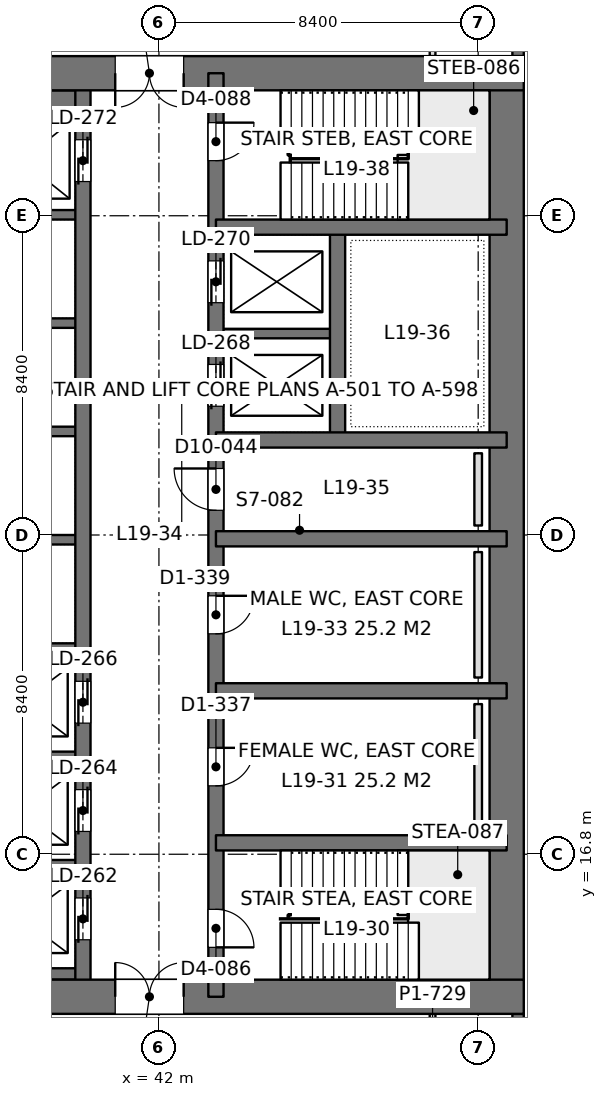
"""IFC4 building model, lengths in metres.
Left out: names, types, materials, properties, quantities, classifications, styles, units other than length and angle.
Written with IfcOpenShell. Run it as: python <this file> out.ifc"""

import sys

from ifc_helpers import new_model, si_unit, direction, frame, frame_2d, origin, place, context, subcontext, project, spatial, rectangle, extrude, element, fill, save


model = new_model("IFC4")
c1 = context("Model", 3, precision=1e-05, world=origin(), true_north=direction((0.0, 1.0)))
c2 = subcontext(c1, "Body", "Model", "MODEL_VIEW")
j1 = project(units=[si_unit("LENGTHUNIT", "METRE"), si_unit("PLANEANGLEUNIT", "RADIAN")], contexts=[c1])
p1 = place(None, origin())
s1 = spatial("IfcSite", under=j1, at=p1, CompositionType="ELEMENT")
p2 = place(p1, origin())
s2 = spatial("IfcBuilding", under=s1, at=p2, CompositionType="ELEMENT")
p3 = place(p2, frame((0.0, 0.0, 86.4)))
s3 = spatial("IfcBuildingStorey", under=s2, at=p3, CompositionType="ELEMENT", Elevation=86.4)
p4 = place(p3, frame((33.6, 13.05, 0.0), z_axis=(0.0, 0.0, 1.0), x_axis=(1.0, 0.0, 0.0)))
e1 = element("IfcWall", 1, at=p4, inside=s3, PredefinedType="SHEAR", context=c2, shape_type="SweptSolid", body=[
    extrude(rectangle(XDim=18.0, YDim=0.9, at=frame_2d((9.0, 0.0))), origin(), (0.0, 0.0, 1.0), 4.5),
])
p5 = place(p4, frame((7.25, 0.0, 0.0)))
e2 = element("IfcOpeningElement", 2, at=p5, cuts=e1, PredefinedType="OPENING", context=c2, shape_type="SweptSolid", body=[
    extrude(rectangle(XDim=1.8, YDim=2.4, at=frame_2d((0.9, 1.2))), frame((0.0, 0.46, 0.0), z_axis=(0.0, -1.0, 0.0), x_axis=(1.0, 0.0, 0.0)), (0.0, 0.0, 1.0), 0.92),
])
p6 = place(p3, frame((33.6, 37.35, 0.0), z_axis=(0.0, 0.0, 1.0), x_axis=(1.0, 0.0, 0.0)))
e3 = element("IfcWall", 3, at=p6, inside=s3, PredefinedType="SHEAR", context=c2, shape_type="SweptSolid", body=[
    extrude(rectangle(XDim=18.0, YDim=0.9, at=frame_2d((9.0, 0.0))), origin(), (0.0, 0.0, 1.0), 4.5),
])
p7 = place(p6, frame((7.25, 0.0, 0.0)))
e4 = element("IfcOpeningElement", 4, at=p7, cuts=e3, PredefinedType="OPENING", context=c2, shape_type="SweptSolid", body=[
    extrude(rectangle(XDim=1.8, YDim=2.4, at=frame_2d((0.9, 1.2))), frame((0.0, 0.46, 0.0), z_axis=(0.0, -1.0, 0.0), x_axis=(1.0, 0.0, 0.0)), (0.0, 0.0, 1.0), 0.92),
])
p8 = place(p3, frame((51.15, 13.05, 0.0), z_axis=(0.0, 0.0, 1.0), x_axis=(0.0, 1.0, 0.0)))
e5 = element("IfcWall", 5, at=p8, inside=s3, PredefinedType="SHEAR", context=c2, shape_type="SweptSolid", body=[
    extrude(rectangle(XDim=24.3, YDim=0.9, at=frame_2d((12.15, 0.0))), origin(), (0.0, 0.0, 1.0), 4.5),
])
p9 = place(p3, frame((43.5, 13.05, 0.0), z_axis=(0.0, 0.0, 1.0), x_axis=(0.0, 1.0, 0.0)))
e6 = element("IfcWall", 6, at=p9, inside=s3, PredefinedType="SHEAR", context=c2, shape_type="SweptSolid", body=[
    extrude(rectangle(XDim=24.3, YDim=0.4, at=frame_2d((12.15, 0.0))), origin(), (0.0, 0.0, 1.0), 4.5),
])
p10 = place(p9, frame((1.3, 0.0, 0.0)))
e7 = element("IfcOpeningElement", 7, at=p10, cuts=e6, PredefinedType="OPENING", context=c2, shape_type="SweptSolid", body=[
    extrude(rectangle(XDim=1.0, YDim=2.2, at=frame_2d((0.5, 1.1))), frame((0.0, 0.21, 0.0), z_axis=(0.0, -1.0, 0.0), x_axis=(1.0, 0.0, 0.0)), (0.0, 0.0, 1.0), 0.42),
])
p11 = place(p9, frame((22.0, 0.0, 0.0)))
e8 = element("IfcOpeningElement", 8, at=p11, cuts=e6, PredefinedType="OPENING", context=c2, shape_type="SweptSolid", body=[
    extrude(rectangle(XDim=1.0, YDim=2.2, at=frame_2d((0.5, 1.1))), frame((0.0, 0.21, 0.0), z_axis=(0.0, -1.0, 0.0), x_axis=(1.0, 0.0, 0.0)), (0.0, 0.0, 1.0), 0.42),
])
p12 = place(p9, frame((5.55, 0.0, 0.0)))
e9 = element("IfcOpeningElement", 9, at=p12, cuts=e6, PredefinedType="OPENING", context=c2, shape_type="SweptSolid", body=[
    extrude(rectangle(XDim=1.0, YDim=2.2, at=frame_2d((0.5, 1.1))), frame((0.0, 0.21, 0.0), z_axis=(0.0, -1.0, 0.0), x_axis=(1.0, 0.0, 0.0)), (0.0, 0.0, 1.0), 0.42),
])
p13 = place(p9, frame((9.55, 0.0, 0.0)))
e10 = element("IfcOpeningElement", 10, at=p13, cuts=e6, PredefinedType="OPENING", context=c2, shape_type="SweptSolid", body=[
    extrude(rectangle(XDim=1.0, YDim=2.2, at=frame_2d((0.5, 1.1))), frame((0.0, 0.21, 0.0), z_axis=(0.0, -1.0, 0.0), x_axis=(1.0, 0.0, 0.0)), (0.0, 0.0, 1.0), 0.42),
])
p14 = place(p9, frame((12.8, 0.0, 0.0)))
e11 = element("IfcOpeningElement", 11, at=p14, cuts=e6, PredefinedType="OPENING", context=c2, shape_type="SweptSolid", body=[
    extrude(rectangle(XDim=1.1, YDim=2.2, at=frame_2d((0.55, 1.1))), frame((0.0, 0.21, 0.0), z_axis=(0.0, -1.0, 0.0), x_axis=(1.0, 0.0, 0.0)), (0.0, 0.0, 1.0), 0.42),
])
p15 = place(p9, frame((15.538, 0.0, 0.0)))
e12 = element("IfcOpeningElement", 12, at=p15, cuts=e6, PredefinedType="OPENING", context=c2, shape_type="SweptSolid", body=[
    extrude(rectangle(XDim=1.1, YDim=2.2, at=frame_2d((0.55, 1.1))), frame((0.0, 0.21, 0.0), z_axis=(0.0, -1.0, 0.0), x_axis=(1.0, 0.0, 0.0)), (0.0, 0.0, 1.0), 0.42),
])
p16 = place(p9, frame((18.262, 0.0, 0.0)))
e13 = element("IfcOpeningElement", 13, at=p16, cuts=e6, PredefinedType="OPENING", context=c2, shape_type="SweptSolid", body=[
    extrude(rectangle(XDim=1.1, YDim=2.2, at=frame_2d((0.55, 1.1))), frame((0.0, 0.21, 0.0), z_axis=(0.0, -1.0, 0.0), x_axis=(1.0, 0.0, 0.0)), (0.0, 0.0, 1.0), 0.42),
])
p17 = place(p3, frame((40.0, 13.05, 0.0), z_axis=(0.0, 0.0, 1.0), x_axis=(0.0, 1.0, 0.0)))
e14 = element("IfcWall", 14, at=p17, inside=s3, PredefinedType="SHEAR", context=c2, shape_type="SweptSolid", body=[
    extrude(rectangle(XDim=24.3, YDim=0.4, at=frame_2d((12.15, 0.0))), origin(), (0.0, 0.0, 1.0), 4.5),
])
p18 = place(p17, frame((1.5, 0.0, 0.0)))
e15 = element("IfcOpeningElement", 15, at=p18, cuts=e14, PredefinedType="OPENING", context=c2, shape_type="SweptSolid", body=[
    extrude(rectangle(XDim=1.1, YDim=2.2, at=frame_2d((0.55, 1.1))), frame((0.0, 0.21, 0.0), z_axis=(0.0, -1.0, 0.0), x_axis=(1.0, 0.0, 0.0)), (0.0, 0.0, 1.0), 0.42),
])
p19 = place(p17, frame((4.35, 0.0, 0.0)))
e16 = element("IfcOpeningElement", 16, at=p19, cuts=e14, PredefinedType="OPENING", context=c2, shape_type="SweptSolid", body=[
    extrude(rectangle(XDim=1.1, YDim=2.2, at=frame_2d((0.55, 1.1))), frame((0.0, 0.21, 0.0), z_axis=(0.0, -1.0, 0.0), x_axis=(1.0, 0.0, 0.0)), (0.0, 0.0, 1.0), 0.42),
])
p20 = place(p17, frame((7.2, 0.0, 0.0)))
e17 = element("IfcOpeningElement", 17, at=p20, cuts=e14, PredefinedType="OPENING", context=c2, shape_type="SweptSolid", body=[
    extrude(rectangle(XDim=1.1, YDim=2.2, at=frame_2d((0.55, 1.1))), frame((0.0, 0.21, 0.0), z_axis=(0.0, -1.0, 0.0), x_axis=(1.0, 0.0, 0.0)), (0.0, 0.0, 1.0), 0.42),
])
p21 = place(p17, frame((21.45, 0.0, 0.0)))
e18 = element("IfcOpeningElement", 18, at=p21, cuts=e14, PredefinedType="OPENING", context=c2, shape_type="SweptSolid", body=[
    extrude(rectangle(XDim=1.1, YDim=2.2, at=frame_2d((0.55, 1.1))), frame((0.0, 0.21, 0.0), z_axis=(0.0, -1.0, 0.0), x_axis=(1.0, 0.0, 0.0)), (0.0, 0.0, 1.0), 0.42),
])
for number, where, z_axis, x_axis in (
    (19, (51.15, 17.1, 0.0), (0.0, 0.0, 1.0), (-1.0, 0.0, 0.0)),
    (20, (51.15, 21.1, 0.0), (0.0, 0.0, 1.0), (-1.0, 0.0, 0.0)),
    (21, (51.15, 25.1, 0.0), (0.0, 0.0, 1.0), (-1.0, 0.0, 0.0)),
    (22, (51.15, 27.7, 0.0), (0.0, 0.0, 1.0), (-1.0, 0.0, 0.0)),
    (23, (51.15, 33.3, 0.0), (0.0, 0.0, 1.0), (-1.0, 0.0, 0.0)),
):
    element("IfcWall", number, at=place(p3, frame(where, z_axis=z_axis, x_axis=x_axis)), inside=s3, PredefinedType="SHEAR", context=c2, shape_type="SweptSolid", body=[
        extrude(rectangle(XDim=7.65, YDim=0.4, at=frame_2d((3.825, 0.0))), origin(), (0.0, 0.0, 1.0), 4.5),
    ])
p22 = place(p3, frame((46.7, 27.7, 0.0), z_axis=(0.0, 0.0, 1.0), x_axis=(0.0, 1.0, 0.0)))
e24 = element("IfcWall", 24, at=p22, inside=s3, PredefinedType="SHEAR", context=c2, shape_type="SweptSolid", body=[
    extrude(rectangle(XDim=5.6, YDim=0.4, at=frame_2d((2.8, 0.0))), origin(), (0.0, 0.0, 1.0), 4.5),
])
p23 = place(p3, frame((46.7, 30.5, 0.0), z_axis=(0.0, 0.0, 1.0), x_axis=(-1.0, 0.0, 0.0)))
e25 = element("IfcWall", 25, at=p23, inside=s3, PredefinedType="SHEAR", context=c2, shape_type="SweptSolid", body=[
    extrude(rectangle(XDim=3.2, YDim=0.25, at=frame_2d((1.6, 0.0))), origin(), (0.0, 0.0, 1.0), 4.5),
])
p24 = place(p3, frame((40.0, 13.65, 0.0), z_axis=(0.0, 0.0, 1.0), x_axis=(-1.0, 0.0, 0.0)))
e26 = element("IfcWall", 26, at=p24, inside=s3, PredefinedType="SHEAR", context=c2, shape_type="SweptSolid", body=[
    extrude(rectangle(XDim=3.2, YDim=0.3, at=frame_2d((1.6, 0.0))), origin(), (0.0, 0.0, 1.0), 4.5),
])
for number, where, z_axis, x_axis in (
    (27, (40.0, 16.525, 0.0), (0.0, 0.0, 1.0), (-1.0, 0.0, 0.0)),
    (28, (40.0, 19.375, 0.0), (0.0, 0.0, 1.0), (-1.0, 0.0, 0.0)),
    (29, (40.0, 22.225, 0.0), (0.0, 0.0, 1.0), (-1.0, 0.0, 0.0)),
    (30, (40.0, 25.075, 0.0), (0.0, 0.0, 1.0), (-1.0, 0.0, 0.0)),
    (31, (40.0, 27.925, 0.0), (0.0, 0.0, 1.0), (-1.0, 0.0, 0.0)),
    (32, (40.0, 30.775, 0.0), (0.0, 0.0, 1.0), (-1.0, 0.0, 0.0)),
    (33, (40.0, 33.625, 0.0), (0.0, 0.0, 1.0), (-1.0, 0.0, 0.0)),
):
    element("IfcWall", number, at=place(p3, frame(where, z_axis=z_axis, x_axis=x_axis)), inside=s3, PredefinedType="SHEAR", context=c2, shape_type="SweptSolid", body=[
        extrude(rectangle(XDim=3.2, YDim=0.25, at=frame_2d((1.6, 0.0))), origin(), (0.0, 0.0, 1.0), 4.5),
    ])
p25 = place(p3, frame((40.0, 36.625, 0.0), z_axis=(0.0, 0.0, 1.0), x_axis=(-1.0, 0.0, 0.0)))
e34 = element("IfcWall", 34, at=p25, inside=s3, PredefinedType="SHEAR", context=c2, shape_type="SweptSolid", body=[
    extrude(rectangle(XDim=3.2, YDim=0.55, at=frame_2d((1.6, 0.0))), origin(), (0.0, 0.0, 1.0), 4.5),
])
p26 = place(p3, frame((51.45, 42.0, 0.0), z_axis=(0.0, 0.0, 1.0), x_axis=(0.0, -1.0, 0.0)))
e35 = element("IfcWall", 35, at=p26, inside=s3, PredefinedType="SOLIDWALL", context=c2, shape_type="SweptSolid", body=[
    extrude(rectangle(XDim=4.2, YDim=0.3, at=frame_2d((2.1, 0.0))), origin(), (0.0, 0.0, 1.0), 4.3),
])
p27 = place(p26, frame((0.9, 0.0, 0.9)))
e36 = element("IfcOpeningElement", 36, at=p27, cuts=e35, PredefinedType="OPENING", context=c2, shape_type="SweptSolid", body=[
    extrude(rectangle(XDim=2.4, YDim=1.9, at=frame_2d((1.2, 0.95))), frame((0.0, 0.16, 0.0), z_axis=(0.0, -1.0, 0.0), x_axis=(1.0, 0.0, 0.0)), (0.0, 0.0, 1.0), 0.32),
])
p28 = place(p3, frame((51.45, 12.6, 0.0), z_axis=(0.0, 0.0, 1.0), x_axis=(0.0, -1.0, 0.0)))
e37 = element("IfcWall", 37, at=p28, inside=s3, PredefinedType="SOLIDWALL", context=c2, shape_type="SweptSolid", body=[
    extrude(rectangle(XDim=4.2, YDim=0.3, at=frame_2d((2.1, 0.0))), origin(), (0.0, 0.0, 1.0), 4.3),
])
p29 = place(p28, frame((0.9, 0.0, 0.9)))
e38 = element("IfcOpeningElement", 38, at=p29, cuts=e37, PredefinedType="OPENING", context=c2, shape_type="SweptSolid", body=[
    extrude(rectangle(XDim=2.4, YDim=1.9, at=frame_2d((1.2, 0.95))), frame((0.0, 0.16, 0.0), z_axis=(0.0, -1.0, 0.0), x_axis=(1.0, 0.0, 0.0)), (0.0, 0.0, 1.0), 0.32),
])
p30 = place(p3, frame((49.2, 10.4, 0.0), z_axis=(0.0, 0.0, 1.0), x_axis=(0.0, 1.0, 0.0)))
e39 = element("IfcWall", 39, at=p30, inside=s3, PredefinedType="PARTITIONING", context=c2, shape_type="SweptSolid", body=[
    extrude(rectangle(XDim=2.202, YDim=0.15, at=frame_2d((1.101, 0.0))), origin(), (0.0, 0.0, 1.0), 4.3),
])
p31 = place(p3, frame((49.2, 37.8, 0.0), z_axis=(0.0, 0.0, 1.0), x_axis=(0.0, 1.0, 0.0)))
e40 = element("IfcWall", 40, at=p31, inside=s3, PredefinedType="PARTITIONING", context=c2, shape_type="SweptSolid", body=[
    extrude(rectangle(XDim=2.2, YDim=0.15, at=frame_2d((1.1, 0.0))), origin(), (0.0, 0.0, 1.0), 4.3),
])
for number, where, z_axis, x_axis in (
    (41, (50.4, 17.45, 0.0), (0.0, 0.0, 1.0), (0.0, 1.0, 0.0)),
    (42, (50.4, 21.45, 0.0), (0.0, 0.0, 1.0), (0.0, 1.0, 0.0)),
):
    element("IfcWall", number, at=place(p3, frame(where, z_axis=z_axis, x_axis=x_axis)), inside=s3, PredefinedType="PLUMBINGWALL", context=c2, shape_type="SweptSolid", body=[
        extrude(rectangle(XDim=3.3, YDim=0.2, at=frame_2d((1.65, 0.0))), origin(), (0.0, 0.0, 1.0), 1.2),
    ])
p32 = place(p3, frame((50.4, 25.45, 0.0), z_axis=(0.0, 0.0, 1.0), x_axis=(0.0, 1.0, 0.0)))
e43 = element("IfcWall", 43, at=p32, inside=s3, PredefinedType="PLUMBINGWALL", context=c2, shape_type="SweptSolid", body=[
    extrude(rectangle(XDim=1.9, YDim=0.2, at=frame_2d((0.95, 0.0))), origin(), (0.0, 0.0, 1.0), 1.2),
])
p33 = place(p5, origin())
e44 = element("IfcDoor", 44, at=p33, inside=s3, OperationType="DOUBLE_DOOR_SINGLE_SWING", PredefinedType="DOOR", context=c2, shape_type="SweptSolid", body=[
    extrude(rectangle(XDim=1.8, YDim=2.4, at=frame_2d((0.9, 1.2))), frame((0.0, 0.025, 0.0), z_axis=(0.0, -1.0, 0.0), x_axis=(1.0, 0.0, 0.0)), (0.0, 0.0, 1.0), 0.05),
])
fill(e2, e44)
p34 = place(p7, frame((1.8, 0.0, 0.0), z_axis=(0.0, 0.0, 1.0), x_axis=(-1.0, 0.0, 0.0)))
e45 = element("IfcDoor", 45, at=p34, inside=s3, OperationType="DOUBLE_DOOR_SINGLE_SWING", PredefinedType="DOOR", context=c2, shape_type="SweptSolid", body=[
    extrude(rectangle(XDim=1.8, YDim=2.4, at=frame_2d((0.9, 1.2))), frame((0.0, 0.025, 0.0), z_axis=(0.0, -1.0, 0.0), x_axis=(1.0, 0.0, 0.0)), (0.0, 0.0, 1.0), 0.05),
])
fill(e4, e45)
p35 = place(p10, frame((1.0, 0.0, 0.0), z_axis=(0.0, 0.0, 1.0), x_axis=(-1.0, 0.0, 0.0)))
e46 = element("IfcDoor", 46, at=p35, inside=s3, OperationType="SINGLE_SWING_RIGHT", PredefinedType="DOOR", context=c2, shape_type="SweptSolid", body=[
    extrude(rectangle(XDim=1.0, YDim=2.2, at=frame_2d((0.5, 1.1))), frame((0.0, 0.025, 0.0), z_axis=(0.0, -1.0, 0.0), x_axis=(1.0, 0.0, 0.0)), (0.0, 0.0, 1.0), 0.05),
])
fill(e7, e46)
p36 = place(p11, frame((1.0, 0.0, 0.0), z_axis=(0.0, 0.0, 1.0), x_axis=(-1.0, 0.0, 0.0)))
e47 = element("IfcDoor", 47, at=p36, inside=s3, OperationType="SINGLE_SWING_LEFT", PredefinedType="DOOR", context=c2, shape_type="SweptSolid", body=[
    extrude(rectangle(XDim=1.0, YDim=2.2, at=frame_2d((0.5, 1.1))), frame((0.0, 0.025, 0.0), z_axis=(0.0, -1.0, 0.0), x_axis=(1.0, 0.0, 0.0)), (0.0, 0.0, 1.0), 0.05),
])
fill(e8, e47)
p37 = place(p12, frame((1.0, 0.0, 0.0), z_axis=(0.0, 0.0, 1.0), x_axis=(-1.0, 0.0, 0.0)))
e48 = element("IfcDoor", 48, at=p37, inside=s3, OperationType="SINGLE_SWING_LEFT", PredefinedType="DOOR", context=c2, shape_type="SweptSolid", body=[
    extrude(rectangle(XDim=1.0, YDim=2.2, at=frame_2d((0.5, 1.1))), frame((0.0, 0.025, 0.0), z_axis=(0.0, -1.0, 0.0), x_axis=(1.0, 0.0, 0.0)), (0.0, 0.0, 1.0), 0.05),
])
fill(e9, e48)
p38 = place(p13, frame((1.0, 0.0, 0.0), z_axis=(0.0, 0.0, 1.0), x_axis=(-1.0, 0.0, 0.0)))
e49 = element("IfcDoor", 49, at=p38, inside=s3, OperationType="SINGLE_SWING_LEFT", PredefinedType="DOOR", context=c2, shape_type="SweptSolid", body=[
    extrude(rectangle(XDim=1.0, YDim=2.2, at=frame_2d((0.5, 1.1))), frame((0.0, 0.025, 0.0), z_axis=(0.0, -1.0, 0.0), x_axis=(1.0, 0.0, 0.0)), (0.0, 0.0, 1.0), 0.05),
])
fill(e10, e49)
p39 = place(p14, origin())
e50 = element("IfcDoor", 50, at=p39, inside=s3, OperationType="SINGLE_SWING_RIGHT", PredefinedType="DOOR", context=c2, shape_type="SweptSolid", body=[
    extrude(rectangle(XDim=1.1, YDim=2.2, at=frame_2d((0.55, 1.1))), frame((0.0, 0.025, 0.0), z_axis=(0.0, -1.0, 0.0), x_axis=(1.0, 0.0, 0.0)), (0.0, 0.0, 1.0), 0.05),
])
fill(e11, e50)
p40 = place(p18, origin())
e51 = element("IfcDoor", 51, at=p40, inside=s3, OperationType="DOUBLE_DOOR_SLIDING", PredefinedType="DOOR", context=c2, shape_type="SweptSolid", body=[
    extrude(rectangle(XDim=1.1, YDim=2.2, at=frame_2d((0.55, 1.1))), frame((0.0, 0.025, 0.0), z_axis=(0.0, -1.0, 0.0), x_axis=(1.0, 0.0, 0.0)), (0.0, 0.0, 1.0), 0.05),
])
fill(e15, e51)
p41 = place(p19, origin())
e52 = element("IfcDoor", 52, at=p41, inside=s3, OperationType="DOUBLE_DOOR_SLIDING", PredefinedType="DOOR", context=c2, shape_type="SweptSolid", body=[
    extrude(rectangle(XDim=1.1, YDim=2.2, at=frame_2d((0.55, 1.1))), frame((0.0, 0.025, 0.0), z_axis=(0.0, -1.0, 0.0), x_axis=(1.0, 0.0, 0.0)), (0.0, 0.0, 1.0), 0.05),
])
fill(e16, e52)
p42 = place(p20, origin())
e53 = element("IfcDoor", 53, at=p42, inside=s3, OperationType="DOUBLE_DOOR_SLIDING", PredefinedType="DOOR", context=c2, shape_type="SweptSolid", body=[
    extrude(rectangle(XDim=1.1, YDim=2.2, at=frame_2d((0.55, 1.1))), frame((0.0, 0.025, 0.0), z_axis=(0.0, -1.0, 0.0), x_axis=(1.0, 0.0, 0.0)), (0.0, 0.0, 1.0), 0.05),
])
fill(e17, e53)
p43 = place(p21, origin())
e54 = element("IfcDoor", 54, at=p43, inside=s3, OperationType="DOUBLE_DOOR_SLIDING", PredefinedType="DOOR", context=c2, shape_type="SweptSolid", body=[
    extrude(rectangle(XDim=1.1, YDim=2.2, at=frame_2d((0.55, 1.1))), frame((0.0, 0.025, 0.0), z_axis=(0.0, -1.0, 0.0), x_axis=(1.0, 0.0, 0.0)), (0.0, 0.0, 1.0), 0.05),
])
fill(e18, e54)
p44 = place(p15, origin())
e55 = element("IfcDoor", 55, at=p44, inside=s3, OperationType="DOUBLE_DOOR_SLIDING", PredefinedType="DOOR", context=c2, shape_type="SweptSolid", body=[
    extrude(rectangle(XDim=1.1, YDim=2.2, at=frame_2d((0.55, 1.1))), frame((0.0, 0.025, 0.0), z_axis=(0.0, -1.0, 0.0), x_axis=(1.0, 0.0, 0.0)), (0.0, 0.0, 1.0), 0.05),
])
fill(e12, e55)
p45 = place(p16, origin())
e56 = element("IfcDoor", 56, at=p45, inside=s3, OperationType="DOUBLE_DOOR_SLIDING", PredefinedType="DOOR", context=c2, shape_type="SweptSolid", body=[
    extrude(rectangle(XDim=1.1, YDim=2.2, at=frame_2d((0.55, 1.1))), frame((0.0, 0.025, 0.0), z_axis=(0.0, -1.0, 0.0), x_axis=(1.0, 0.0, 0.0)), (0.0, 0.0, 1.0), 0.05),
])
fill(e13, e56)
save(model, sys.argv[1])
